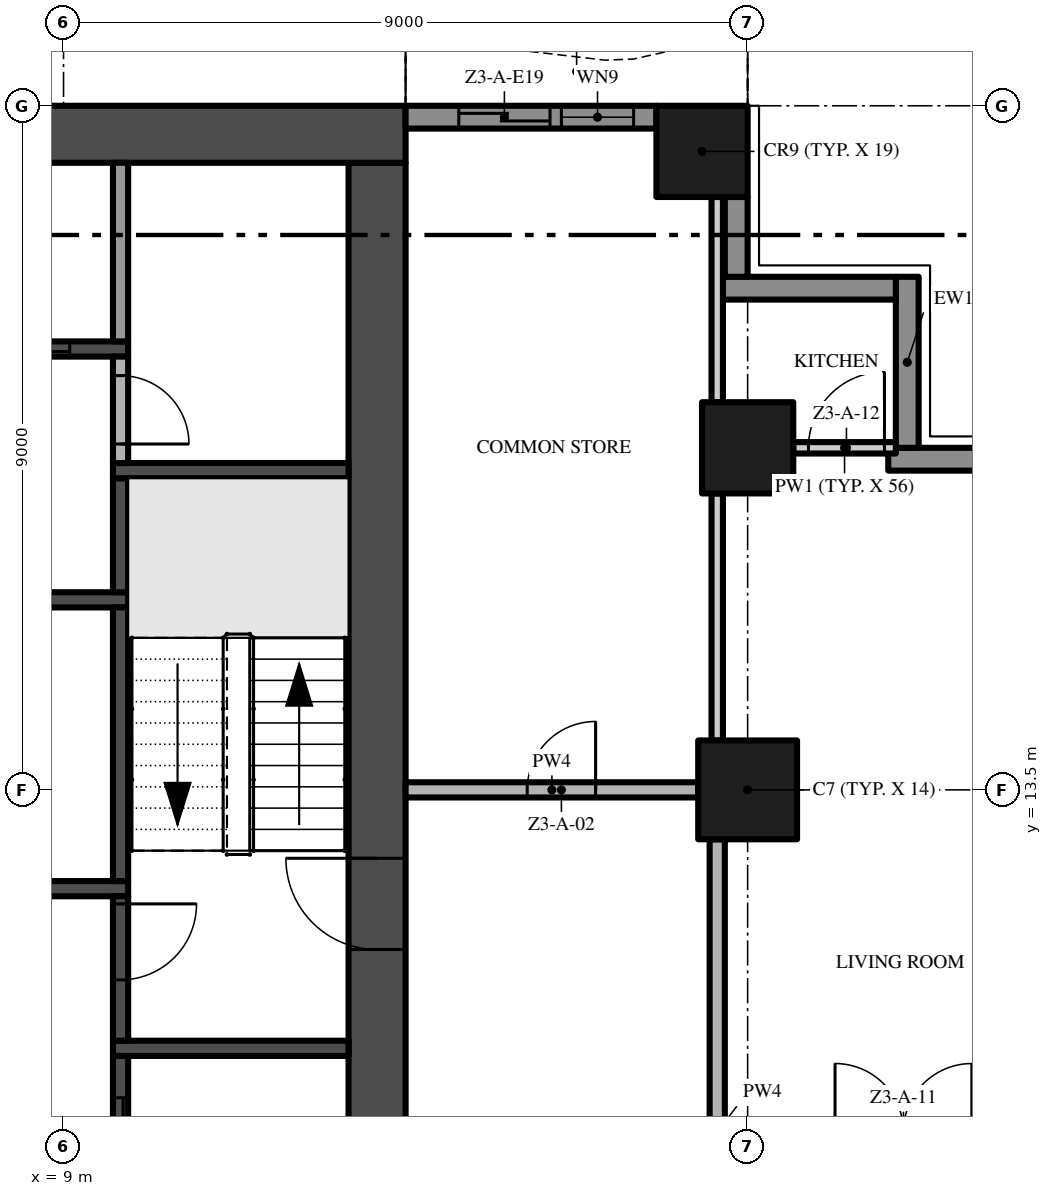
"""IFC4 building model, lengths in metres.
Left out: names, types, materials, properties, quantities, classifications, styles, units other than length and angle.
Written with IfcOpenShell. Run it as: python <this file> out.ifc"""

import sys

from ifc_helpers import new_model, si_unit, direction, frame, frame_2d, origin, origin_2d, place, context, subcontext, project, spatial, polyline, rectangle, outline, extrude, element, fill, save


model = new_model("IFC4")
c1 = context("Model", 3, precision=1e-05, world=origin(), true_north=direction((0.0, 1.0)))
c2 = subcontext(c1, "Body", "Model", "MODEL_VIEW")
j1 = project(units=[si_unit("LENGTHUNIT", "METRE"), si_unit("PLANEANGLEUNIT", "RADIAN")], contexts=[c1])
p1 = place(None, origin())
s1 = spatial("IfcSite", under=j1, at=p1, CompositionType="ELEMENT")
p2 = place(p1, origin())
s2 = spatial("IfcBuilding", under=s1, at=p2, CompositionType="ELEMENT")
p3 = place(p2, frame((0.0, 0.0, 132.6)))
s3 = spatial("IfcBuildingStorey", under=s2, at=p3, CompositionType="ELEMENT", Elevation=132.6)
p4 = place(p3, frame((13.125, 5.25, -0.3), z_axis=(0.0, 0.0, 1.0), x_axis=(0.0, 1.0, 0.0)))
e1 = element("IfcWall", 1, at=p4, inside=s3, PredefinedType="SHEAR", context=c2, shape_type="SweptSolid", body=[
    extrude(rectangle(XDim=16.5, YDim=0.75, at=frame_2d((8.25, 0.0))), origin(), (0.0, 0.0, 1.0), 3.8),
])
p5 = place(p4, frame((6.15, 0.0, 0.3)))
e2 = element("IfcOpeningElement", 2, at=p5, cuts=e1, PredefinedType="OPENING", context=c2, shape_type="SweptSolid", body=[
    extrude(rectangle(XDim=1.2, YDim=2.2, at=frame_2d((0.6, 1.1))), frame((0.0, 0.385, 0.0), z_axis=(0.0, -1.0, 0.0), x_axis=(1.0, 0.0, 0.0)), (0.0, 0.0, 1.0), 0.77),
])
p6 = place(p3, frame((13.5, 22.125, -0.3), z_axis=(0.0, 0.0, 1.0), x_axis=(-1.0, 0.0, 0.0)))
e3 = element("IfcWall", 3, at=p6, inside=s3, PredefinedType="SHEAR", context=c2, shape_type="SweptSolid", body=[
    extrude(rectangle(XDim=27.0, YDim=0.75, at=frame_2d((13.5, 0.0))), origin(), (0.0, 0.0, 1.0), 3.8),
])
p7 = place(p3, frame((18.0, 13.5, 0.0), z_axis=(0.0, 0.0, 1.0), x_axis=(1.0, 0.0, 0.0)))
e4 = element("IfcColumn", 4, at=p7, inside=s3, PredefinedType="COLUMN", context=c2, shape_type="SweptSolid", body=[
    extrude(rectangle(XDim=1.3, YDim=1.3, at=origin_2d()), origin(), (0.0, 0.0, 1.0), 3.5),
])
for number, where, z_axis, x_axis in (
    (5, (17.4, 21.9, 0.0), (0.0, 0.0, 1.0), (1.0, 0.0, 0.0)),
    (6, (18.0, 18.0, 0.0), (0.0, 0.0, 1.0), (1.0, 0.0, 0.0)),
):
    element("IfcColumn", number, at=place(p3, frame(where, z_axis=z_axis, x_axis=x_axis)), inside=s3, PredefinedType="COLUMN", context=c2, shape_type="SweptSolid", body=[
        extrude(rectangle(XDim=1.2, YDim=1.2, at=origin_2d()), origin(), (0.0, 0.0, 1.0), 3.5),
    ])
p8 = place(p3, frame((19.85, 17.85, 0.0), z_axis=(0.0, 0.0, 1.0), x_axis=(1.0, 0.0, 0.0)))
e7 = element("IfcWall", 7, at=p8, inside=s3, PredefinedType="SOLIDWALL", context=c2, shape_type="SweptSolid", body=[
    extrude(rectangle(XDim=2.35, YDim=0.3, at=frame_2d((1.175, 0.0))), origin(), (0.0, 0.0, 1.0), 3.5),
])
p9 = place(p3, frame((20.1, 20.25, 0.0), z_axis=(0.0, 0.0, 1.0), x_axis=(0.0, -1.0, 0.0)))
e8 = element("IfcWall", 8, at=p9, inside=s3, PredefinedType="SOLIDWALL", context=c2, shape_type="SweptSolid", body=[
    extrude(rectangle(XDim=2.25, YDim=0.3, at=frame_2d((1.125, 0.0))), origin(), (0.0, 0.0, 1.0), 3.5),
])
p10 = place(p3, frame((17.6, 20.1, 0.0), z_axis=(0.0, 0.0, 1.0), x_axis=(1.0, 0.0, 0.0)))
e9 = element("IfcWall", 9, at=p10, inside=s3, PredefinedType="SOLIDWALL", context=c2, shape_type="SweptSolid", body=[
    extrude(rectangle(XDim=2.35, YDim=0.3, at=frame_2d((1.175, 0.0))), origin(), (0.0, 0.0, 1.0), 3.5),
])
p11 = place(p3, frame((17.85, 21.3, 0.0), z_axis=(0.0, 0.0, 1.0), x_axis=(0.0, -1.0, 0.0)))
e10 = element("IfcWall", 10, at=p11, inside=s3, PredefinedType="SOLIDWALL", context=c2, shape_type="SweptSolid", body=[
    extrude(rectangle(XDim=1.05, YDim=0.3, at=frame_2d((0.525, 0.0))), origin(), (0.0, 0.0, 1.0), 3.5),
])
p12 = place(p3, frame((13.5, 22.35, 0.0), z_axis=(0.0, 0.0, 1.0), x_axis=(1.0, 0.0, 0.0)))
e11 = element("IfcWall", 11, at=p12, inside=s3, PredefinedType="SOLIDWALL", context=c2, shape_type="SweptSolid", body=[
    extrude(rectangle(XDim=3.3, YDim=0.3, at=frame_2d((1.65, 0.0))), origin(), (0.0, 0.0, 1.0), 3.5),
])
p13 = place(p12, frame((2.05, 0.0, 0.45)))
e12 = element("IfcOpeningElement", 12, at=p13, cuts=e11, PredefinedType="OPENING", context=c2, shape_type="SweptSolid", body=[
    extrude(rectangle(XDim=0.95, YDim=2.65, at=frame_2d((0.475, 1.325))), frame((0.0, 0.16, 0.0), z_axis=(0.0, -1.0, 0.0), x_axis=(1.0, 0.0, 0.0)), (0.0, 0.0, 1.0), 0.32),
])
p14 = place(p12, frame((0.7, 0.0, 0.0)))
e13 = element("IfcOpeningElement", 13, at=p14, cuts=e11, PredefinedType="OPENING", context=c2, shape_type="SweptSolid", body=[
    extrude(rectangle(XDim=1.2, YDim=2.4, at=frame_2d((0.6, 1.2))), frame((0.0, 0.16, 0.0), z_axis=(0.0, -1.0, 0.0), x_axis=(1.0, 0.0, 0.0)), (0.0, 0.0, 1.0), 0.32),
])
p15 = place(p3, origin())
e14 = element("IfcWall", 14, at=p15, inside=s3, PredefinedType="USERDEFINED", context=c2, shape_type="SweptSolid", body=[
    extrude(outline(polyline([(18.0, 23.451), (16.5, 23.115), (16.125, 23.1), (15.0, 23.231), (13.5, 23.755), (13.417, 23.519), (14.944, 22.986), (16.115, 22.849), (16.533, 22.866), (18.055, 23.208), (18.0, 23.451)])), origin(), (0.0, 0.0, 1.0), 0.9),
])
p16 = place(p3, frame((-9.85, 19.3, 0.0), z_axis=(0.0, 0.0, 1.0), x_axis=(1.0, 0.0, 0.0)))
e15 = element("IfcWall", 15, at=p16, inside=s3, PredefinedType="SHEAR", context=c2, shape_type="SweptSolid", body=[
    extrude(rectangle(XDim=19.7, YDim=0.2, at=frame_2d((9.85, 0.0))), origin(), (0.0, 0.0, 1.0), 3.5),
])
p17 = place(p16, frame((10.519, 0.0, 0.0)))
e16 = element("IfcOpeningElement", 16, at=p17, cuts=e15, PredefinedType="OPENING", context=c2, shape_type="SweptSolid", body=[
    extrude(rectangle(XDim=1.1, YDim=2.1, at=frame_2d((0.55, 1.05))), frame((0.0, 0.11, 0.0), z_axis=(0.0, -1.0, 0.0), x_axis=(1.0, 0.0, 0.0)), (0.0, 0.0, 1.0), 0.22),
])
p18 = place(p16, frame((12.956, 0.0, 0.0)))
e17 = element("IfcOpeningElement", 17, at=p18, cuts=e15, PredefinedType="OPENING", context=c2, shape_type="SweptSolid", body=[
    extrude(rectangle(XDim=1.1, YDim=2.1, at=frame_2d((0.55, 1.05))), frame((0.0, 0.11, 0.0), z_axis=(0.0, -1.0, 0.0), x_axis=(1.0, 0.0, 0.0)), (0.0, 0.0, 1.0), 0.22),
])
p19 = place(p16, frame((15.394, 0.0, 0.0)))
e18 = element("IfcOpeningElement", 18, at=p19, cuts=e15, PredefinedType="OPENING", context=c2, shape_type="SweptSolid", body=[
    extrude(rectangle(XDim=1.1, YDim=2.1, at=frame_2d((0.55, 1.05))), frame((0.0, 0.11, 0.0), z_axis=(0.0, -1.0, 0.0), x_axis=(1.0, 0.0, 0.0)), (0.0, 0.0, 1.0), 0.22),
])
p20 = place(p16, frame((17.831, 0.0, 0.0)))
e19 = element("IfcOpeningElement", 19, at=p20, cuts=e15, PredefinedType="OPENING", context=c2, shape_type="SweptSolid", body=[
    extrude(rectangle(XDim=1.1, YDim=2.1, at=frame_2d((0.55, 1.05))), frame((0.0, 0.11, 0.0), z_axis=(0.0, -1.0, 0.0), x_axis=(1.0, 0.0, 0.0)), (0.0, 0.0, 1.0), 0.22),
])
p21 = place(p16, frame((3.306, 0.0, 0.0)))
e20 = element("IfcOpeningElement", 20, at=p21, cuts=e15, PredefinedType="OPENING", context=c2, shape_type="SweptSolid", body=[
    extrude(rectangle(XDim=0.9, YDim=2.1, at=frame_2d((0.45, 1.05))), frame((0.0, 0.11, 0.0), z_axis=(0.0, -1.0, 0.0), x_axis=(1.0, 0.0, 0.0)), (0.0, 0.0, 1.0), 0.22),
])
p22 = place(p16, frame((8.181, 0.0, 0.0)))
e21 = element("IfcOpeningElement", 21, at=p22, cuts=e15, PredefinedType="OPENING", context=c2, shape_type="SweptSolid", body=[
    extrude(rectangle(XDim=0.9, YDim=2.1, at=frame_2d((0.45, 1.05))), frame((0.0, 0.11, 0.0), z_axis=(0.0, -1.0, 0.0), x_axis=(1.0, 0.0, 0.0)), (0.0, 0.0, 1.0), 0.22),
])
p23 = place(p3, frame((9.85, 16.0, 0.0), z_axis=(0.0, 0.0, 1.0), x_axis=(-1.0, 0.0, 0.0)))
e22 = element("IfcWall", 22, at=p23, inside=s3, PredefinedType="SHEAR", context=c2, shape_type="SweptSolid", body=[
    extrude(rectangle(XDim=8.35, YDim=0.2, at=frame_2d((4.175, 0.0))), origin(), (0.0, 0.0, 1.0), 3.5),
])
p24 = place(p23, frame((6.481, 0.0, 0.0)))
e23 = element("IfcOpeningElement", 23, at=p24, cuts=e22, PredefinedType="OPENING", context=c2, shape_type="SweptSolid", body=[
    extrude(rectangle(XDim=1.1, YDim=2.1, at=frame_2d((0.55, 1.05))), frame((0.0, 0.11, 0.0), z_axis=(0.0, -1.0, 0.0), x_axis=(1.0, 0.0, 0.0)), (0.0, 0.0, 1.0), 0.22),
])
p25 = place(p23, frame((4.044, 0.0, 0.0)))
e24 = element("IfcOpeningElement", 24, at=p25, cuts=e22, PredefinedType="OPENING", context=c2, shape_type="SweptSolid", body=[
    extrude(rectangle(XDim=1.1, YDim=2.1, at=frame_2d((0.55, 1.05))), frame((0.0, 0.11, 0.0), z_axis=(0.0, -1.0, 0.0), x_axis=(1.0, 0.0, 0.0)), (0.0, 0.0, 1.0), 0.22),
])
p26 = place(p23, frame((1.288, 0.0, 0.0)))
e25 = element("IfcOpeningElement", 25, at=p26, cuts=e22, PredefinedType="OPENING", context=c2, shape_type="SweptSolid", body=[
    extrude(rectangle(XDim=0.9, YDim=2.1, at=frame_2d((0.45, 1.05))), frame((0.0, 0.11, 0.0), z_axis=(0.0, -1.0, 0.0), x_axis=(1.0, 0.0, 0.0)), (0.0, 0.0, 1.0), 0.22),
])
p27 = place(p3, frame((6.375, 12.2, 0.0), z_axis=(0.0, 0.0, 1.0), x_axis=(1.0, 0.0, 0.0)))
e26 = element("IfcWall", 26, at=p27, inside=s3, PredefinedType="SHEAR", context=c2, shape_type="SweptSolid", body=[
    extrude(rectangle(XDim=3.475, YDim=0.2, at=frame_2d((1.738, 0.0))), origin(), (0.0, 0.0, 1.0), 3.5),
])
p28 = place(p3, frame((9.75, 7.8, 0.0), z_axis=(0.0, 0.0, 1.0), x_axis=(0.0, 1.0, 0.0)))
e27 = element("IfcWall", 27, at=p28, inside=s3, PredefinedType="SHEAR", context=c2, shape_type="SweptSolid", body=[
    extrude(rectangle(XDim=2.2, YDim=0.2, at=frame_2d((1.1, 0.0))), origin(), (0.0, 0.0, 1.0), 3.5),
])
p29 = place(p28, frame((0.55, 0.0, 0.0)))
e28 = element("IfcOpeningElement", 28, at=p29, cuts=e27, PredefinedType="OPENING", context=c2, shape_type="SweptSolid", body=[
    extrude(rectangle(XDim=1.1, YDim=2.1, at=frame_2d((0.55, 1.05))), frame((0.0, 0.11, 0.0), z_axis=(0.0, -1.0, 0.0), x_axis=(1.0, 0.0, 0.0)), (0.0, 0.0, 1.0), 0.22),
])
p30 = place(p3, frame((9.65, 10.1, 0.0), z_axis=(0.0, 0.0, 1.0), x_axis=(1.0, 0.0, 0.0)))
e29 = element("IfcWall", 29, at=p30, inside=s3, PredefinedType="SHEAR", context=c2, shape_type="SweptSolid", body=[
    extrude(rectangle(XDim=3.1, YDim=0.2, at=frame_2d((1.55, 0.0))), origin(), (0.0, 0.0, 1.0), 3.5),
])
p31 = place(p3, frame((9.75, 12.1, 0.0), z_axis=(0.0, 0.0, 1.0), x_axis=(0.0, -1.0, 0.0)))
e30 = element("IfcWall", 30, at=p31, inside=s3, PredefinedType="SHEAR", context=c2, shape_type="SweptSolid", body=[
    extrude(rectangle(XDim=1.9, YDim=0.2, at=frame_2d((0.95, 0.0))), origin(), (0.0, 0.0, 1.0), 3.5),
])
p32 = place(p31, frame((0.1, 0.0, 0.0)))
e31 = element("IfcOpeningElement", 31, at=p32, cuts=e30, PredefinedType="OPENING", context=c2, shape_type="SweptSolid", body=[
    extrude(rectangle(XDim=1.0, YDim=2.2, at=frame_2d((0.5, 1.1))), frame((0.0, 0.11, 0.0), z_axis=(0.0, -1.0, 0.0), x_axis=(1.0, 0.0, 0.0)), (0.0, 0.0, 1.0), 0.22),
])
p33 = place(p3, frame((9.75, 12.3, 0.0), z_axis=(0.0, 0.0, 1.0), x_axis=(0.0, 1.0, 0.0)))
e32 = element("IfcWall", 32, at=p33, inside=s3, PredefinedType="SHEAR", context=c2, shape_type="SweptSolid", body=[
    extrude(rectangle(XDim=3.6, YDim=0.2, at=frame_2d((1.8, 0.0))), origin(), (0.0, 0.0, 1.0), 3.5),
])
p34 = place(p3, frame((9.75, 16.1, 0.0), z_axis=(0.0, 0.0, 1.0), x_axis=(0.0, 1.0, 0.0)))
e33 = element("IfcWall", 33, at=p34, inside=s3, PredefinedType="SHEAR", context=c2, shape_type="SweptSolid", body=[
    extrude(rectangle(XDim=1.5, YDim=0.2, at=frame_2d((0.75, 0.0))), origin(), (0.0, 0.0, 1.0), 3.5),
])
p35 = place(p3, frame((9.65, 17.7, 0.0), z_axis=(0.0, 0.0, 1.0), x_axis=(1.0, 0.0, 0.0)))
e34 = element("IfcWall", 34, at=p35, inside=s3, PredefinedType="SHEAR", context=c2, shape_type="SweptSolid", body=[
    extrude(rectangle(XDim=3.1, YDim=0.2, at=frame_2d((1.55, 0.0))), origin(), (0.0, 0.0, 1.0), 3.5),
])
p36 = place(p3, frame((9.75, 19.2, 0.0), z_axis=(0.0, 0.0, 1.0), x_axis=(0.0, -1.0, 0.0)))
e35 = element("IfcWall", 35, at=p36, inside=s3, PredefinedType="PARTITIONING", context=c2, shape_type="SweptSolid", body=[
    extrude(rectangle(XDim=1.4, YDim=0.2, at=frame_2d((0.7, 0.0))), origin(), (0.0, 0.0, 1.0), 3.5),
])
p37 = place(p36, frame((0.25, 0.0, 0.0)))
e36 = element("IfcOpeningElement", 36, at=p37, cuts=e35, PredefinedType="OPENING", context=c2, shape_type="SweptSolid", body=[
    extrude(rectangle(XDim=0.9, YDim=2.1, at=frame_2d((0.45, 1.05))), frame((0.0, 0.11, 0.0), z_axis=(0.0, -1.0, 0.0), x_axis=(1.0, 0.0, 0.0)), (0.0, 0.0, 1.0), 0.22),
])
p38 = place(p3, frame((9.75, 19.4, 0.0), z_axis=(0.0, 0.0, 1.0), x_axis=(0.0, 1.0, 0.0)))
e37 = element("IfcWall", 37, at=p38, inside=s3, PredefinedType="PARTITIONING", context=c2, shape_type="SweptSolid", body=[
    extrude(rectangle(XDim=2.35, YDim=0.2, at=frame_2d((1.175, 0.0))), origin(), (0.0, 0.0, 1.0), 3.5),
])
p39 = place(p3, frame((13.5, 13.5, 0.0), z_axis=(0.0, 0.0, 1.0), x_axis=(1.0, 0.0, 0.0)))
e38 = element("IfcWall", 38, at=p39, inside=s3, PredefinedType="PARTITIONING", context=c2, shape_type="SweptSolid", body=[
    extrude(rectangle(XDim=3.85, YDim=0.2, at=frame_2d((1.925, 0.0))), origin(), (0.0, 0.0, 1.0), 3.5),
])
p40 = place(p39, frame((1.6, 0.0, 0.0)))
e39 = element("IfcOpeningElement", 39, at=p40, cuts=e38, PredefinedType="OPENING", context=c2, shape_type="SweptSolid", body=[
    extrude(rectangle(XDim=0.9, YDim=2.1, at=frame_2d((0.45, 1.05))), frame((0.0, 0.11, 0.0), z_axis=(0.0, -1.0, 0.0), x_axis=(1.0, 0.0, 0.0)), (0.0, 0.0, 1.0), 0.22),
])
p41 = place(p3, frame((18.6, 18.0, 0.0), z_axis=(0.0, 0.0, 1.0), x_axis=(1.0, 0.0, 0.0)))
e40 = element("IfcWall", 40, at=p41, inside=s3, PredefinedType="PARTITIONING", context=c2, shape_type="SweptSolid", body=[
    extrude(rectangle(XDim=1.35, YDim=0.15, at=frame_2d((0.675, 0.0))), origin(), (0.0, 0.0, 1.0), 3.5),
])
p42 = place(p41, frame((0.2, 0.0, 0.0)))
e41 = element("IfcOpeningElement", 41, at=p42, cuts=e40, PredefinedType="OPENING", context=c2, shape_type="SweptSolid", body=[
    extrude(rectangle(XDim=1.0, YDim=2.4, at=frame_2d((0.5, 1.2))), frame((0.0, 0.085, 0.0), z_axis=(0.0, -1.0, 0.0), x_axis=(1.0, 0.0, 0.0)), (0.0, 0.0, 1.0), 0.17),
])
p43 = place(p3, frame((17.6, 12.85, 0.0), z_axis=(0.0, 0.0, 1.0), x_axis=(0.0, -1.0, 0.0)))
e42 = element("IfcWall", 42, at=p43, inside=s3, PredefinedType="PARTITIONING", context=c2, shape_type="SweptSolid", body=[
    extrude(rectangle(XDim=7.7, YDim=0.2, at=frame_2d((3.85, 0.0))), origin(), (0.0, 0.0, 1.0), 3.5),
])
p44 = place(p43, frame((5.5, 0.0, 0.0)))
e43 = element("IfcOpeningElement", 43, at=p44, cuts=e42, PredefinedType="OPENING", context=c2, shape_type="SweptSolid", body=[
    extrude(rectangle(XDim=1.2, YDim=2.4, at=frame_2d((0.6, 1.2))), frame((0.0, 0.11, 0.0), z_axis=(0.0, -1.0, 0.0), x_axis=(1.0, 0.0, 0.0)), (0.0, 0.0, 1.0), 0.22),
])
p45 = place(p3, frame((17.6, 14.15, 0.0), z_axis=(0.0, 0.0, 1.0), x_axis=(0.0, 1.0, 0.0)))
e44 = element("IfcWall", 44, at=p45, inside=s3, PredefinedType="PARTITIONING", context=c2, shape_type="SweptSolid", body=[
    extrude(rectangle(XDim=3.25, YDim=0.15, at=frame_2d((1.625, 0.0))), origin(), (0.0, 0.0, 1.0), 3.5),
])
p46 = place(p3, frame((17.6, 18.6, 0.0), z_axis=(0.0, 0.0, 1.0), x_axis=(0.0, 1.0, 0.0)))
e45 = element("IfcWall", 45, at=p46, inside=s3, PredefinedType="PARTITIONING", context=c2, shape_type="SweptSolid", body=[
    extrude(rectangle(XDim=2.7, YDim=0.15, at=frame_2d((1.35, 0.0))), origin(), (0.0, 0.0, 1.0), 3.5),
])
p47 = place(p13, origin())
e46 = element("IfcWindow", 46, at=p47, inside=s3, PartitioningType="SINGLE_PANEL", PredefinedType="WINDOW", context=c2, shape_type="SweptSolid", body=[
    extrude(rectangle(XDim=0.95, YDim=2.65, at=frame_2d((0.475, 1.325))), frame((0.0, 0.03, 0.0), z_axis=(0.0, -1.0, 0.0), x_axis=(1.0, 0.0, 0.0)), (0.0, 0.0, 1.0), 0.06),
])
fill(e12, e46)
p48 = place(p14, origin())
e47 = element("IfcDoor", 47, at=p48, inside=s3, OperationType="SINGLE_SWING_LEFT", PredefinedType="DOOR", context=c2, shape_type="SweptSolid", body=[
    extrude(rectangle(XDim=1.2, YDim=2.4, at=frame_2d((0.6, 1.2))), frame((0.0, 0.025, 0.0), z_axis=(0.0, -1.0, 0.0), x_axis=(1.0, 0.0, 0.0)), (0.0, 0.0, 1.0), 0.05),
])
fill(e13, e47)
p49 = place(p5, frame((1.2, 0.0, 0.0), z_axis=(0.0, 0.0, 1.0), x_axis=(-1.0, 0.0, 0.0)))
e48 = element("IfcDoor", 48, at=p49, inside=s3, OperationType="SINGLE_SWING_LEFT", PredefinedType="DOOR", context=c2, shape_type="SweptSolid", body=[
    extrude(rectangle(XDim=1.2, YDim=2.2, at=frame_2d((0.6, 1.1))), frame((0.0, 0.025, 0.0), z_axis=(0.0, -1.0, 0.0), x_axis=(1.0, 0.0, 0.0)), (0.0, 0.0, 1.0), 0.05),
])
fill(e2, e48)
p50 = place(p32, origin())
e49 = element("IfcDoor", 49, at=p50, inside=s3, OperationType="SINGLE_SWING_LEFT", PredefinedType="DOOR", context=c2, shape_type="SweptSolid", body=[
    extrude(rectangle(XDim=1.0, YDim=2.2, at=frame_2d((0.5, 1.1))), frame((0.0, 0.025, 0.0), z_axis=(0.0, -1.0, 0.0), x_axis=(1.0, 0.0, 0.0)), (0.0, 0.0, 1.0), 0.05),
])
fill(e31, e49)
p51 = place(p20, origin())
e50 = element("IfcDoor", 50, at=p51, inside=s3, OperationType="SLIDING_TO_RIGHT", PredefinedType="DOOR", context=c2, shape_type="SweptSolid", body=[
    extrude(rectangle(XDim=1.1, YDim=2.1, at=frame_2d((0.55, 1.05))), frame((0.0, 0.025, 0.0), z_axis=(0.0, -1.0, 0.0), x_axis=(1.0, 0.0, 0.0)), (0.0, 0.0, 1.0), 0.05),
])
fill(e19, e50)
p52 = place(p29, origin())
e51 = element("IfcDoor", 51, at=p52, inside=s3, OperationType="SLIDING_TO_RIGHT", PredefinedType="DOOR", context=c2, shape_type="SweptSolid", body=[
    extrude(rectangle(XDim=1.1, YDim=2.1, at=frame_2d((0.55, 1.05))), frame((0.0, 0.025, 0.0), z_axis=(0.0, -1.0, 0.0), x_axis=(1.0, 0.0, 0.0)), (0.0, 0.0, 1.0), 0.05),
])
fill(e28, e51)
p53 = place(p37, origin())
e52 = element("IfcDoor", 52, at=p53, inside=s3, OperationType="SINGLE_SWING_RIGHT", PredefinedType="DOOR", context=c2, shape_type="SweptSolid", body=[
    extrude(rectangle(XDim=0.9, YDim=2.1, at=frame_2d((0.45, 1.05))), frame((0.0, 0.025, 0.0), z_axis=(0.0, -1.0, 0.0), x_axis=(1.0, 0.0, 0.0)), (0.0, 0.0, 1.0), 0.05),
])
fill(e36, e52)
p54 = place(p40, origin())
e53 = element("IfcDoor", 53, at=p54, inside=s3, OperationType="SINGLE_SWING_RIGHT", PredefinedType="DOOR", context=c2, shape_type="SweptSolid", body=[
    extrude(rectangle(XDim=0.9, YDim=2.1, at=frame_2d((0.45, 1.05))), frame((0.0, 0.025, 0.0), z_axis=(0.0, -1.0, 0.0), x_axis=(1.0, 0.0, 0.0)), (0.0, 0.0, 1.0), 0.05),
])
fill(e39, e53)
p55 = place(p42, origin())
e54 = element("IfcDoor", 54, at=p55, inside=s3, OperationType="SINGLE_SWING_RIGHT", PredefinedType="DOOR", context=c2, shape_type="SweptSolid", body=[
    extrude(rectangle(XDim=1.0, YDim=2.4, at=frame_2d((0.5, 1.2))), frame((0.0, 0.025, 0.0), z_axis=(0.0, -1.0, 0.0), x_axis=(1.0, 0.0, 0.0)), (0.0, 0.0, 1.0), 0.05),
])
fill(e41, e54)
save(model, sys.argv[1])
